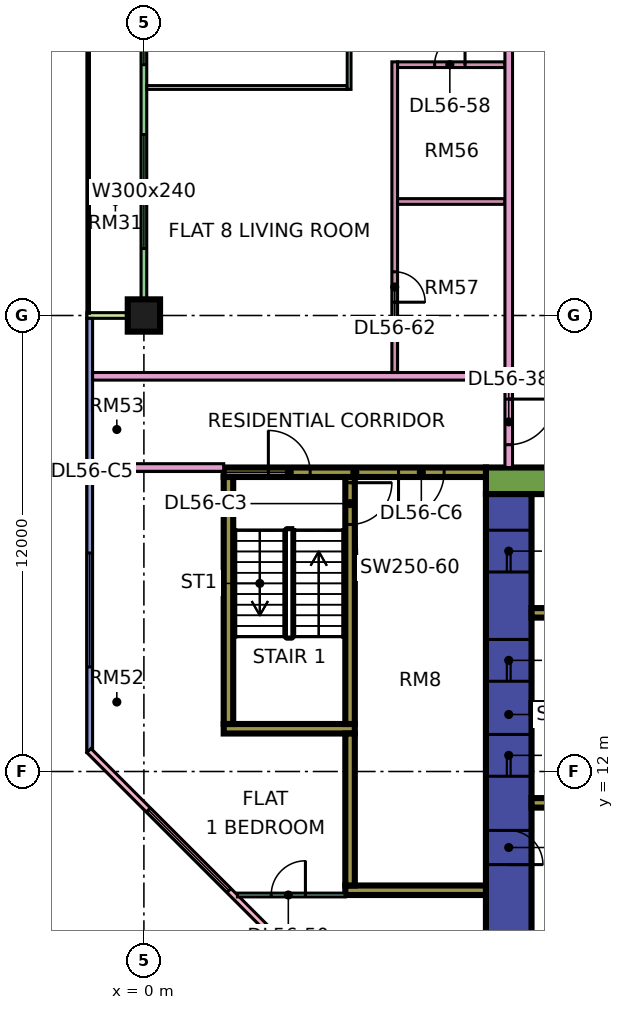
"""IFC4 building model, lengths in metres.
Left out: names, types, materials, properties, quantities, classifications, styles, units other than length and angle.
Written with IfcOpenShell. Run it as: python <this file> out.ifc"""

import sys

from ifc_helpers import new_model, si_unit, direction, frame, frame_2d, origin, origin_2d, place, context, subcontext, project, spatial, rectangle, extrude, element, fill, save


model = new_model("IFC4")
c1 = context("Model", 3, precision=1e-05, world=origin(), true_north=direction((0.0, 1.0)))
c2 = subcontext(c1, "Body", "Model", "MODEL_VIEW")
j1 = project(units=[si_unit("LENGTHUNIT", "METRE"), si_unit("PLANEANGLEUNIT", "RADIAN")], contexts=[c1])
p1 = place(None, origin())
s1 = spatial("IfcSite", under=j1, at=p1, CompositionType="ELEMENT")
p2 = place(p1, origin())
s2 = spatial("IfcBuilding", under=s1, at=p2, CompositionType="ELEMENT")
p3 = place(p2, frame((0.0, 0.0, 237.9)))
s3 = spatial("IfcBuildingStorey", under=s2, at=p3, CompositionType="ELEMENT", Elevation=237.9)
p4 = place(p3, frame((0.0, 24.0, 0.0), z_axis=(0.0, 0.0, 1.0), x_axis=(1.0, 0.0, 0.0)))
e1 = element("IfcColumn", 1, at=p4, inside=s3, PredefinedType="COLUMN", context=c2, shape_type="SweptSolid", body=[
    extrude(rectangle(XDim=0.85, YDim=0.85, at=origin_2d()), origin(), (0.0, 0.0, 1.0), 3.75),
])
p5 = place(p3, frame((9.0, 19.65, 0.0), z_axis=(0.0, 0.0, 1.0), x_axis=(1.0, 0.0, 0.0)))
e2 = element("IfcWall", 2, at=p5, inside=s3, PredefinedType="SHEAR", context=c2, shape_type="SweptSolid", body=[
    extrude(rectangle(XDim=25.0, YDim=0.7, at=frame_2d((12.5, 0.0))), origin(), (0.0, 0.0, 1.0), 3.75),
])
p6 = place(p5, frame((19.1, 0.0, 0.0)))
e3 = element("IfcOpeningElement", 3, at=p6, cuts=e2, PredefinedType="OPENING", context=c2, shape_type="SweptSolid", body=[
    extrude(rectangle(XDim=1.8, YDim=2.4, at=frame_2d((0.9, 1.2))), frame((0.0, 0.36, 0.0), z_axis=(0.0, -1.0, 0.0), x_axis=(1.0, 0.0, 0.0)), (0.0, 0.0, 1.0), 0.72),
])
p7 = place(p3, frame((9.6, 7.7, 0.0), z_axis=(0.0, 0.0, 1.0), x_axis=(0.0, 1.0, 0.0)))
e4 = element("IfcWall", 4, at=p7, inside=s3, PredefinedType="SHEAR", context=c2, shape_type="SweptSolid", body=[
    extrude(rectangle(XDim=11.6, YDim=1.2, at=frame_2d((5.8, 0.0))), origin(), (0.0, 0.0, 1.0), 3.75),
])
p8 = place(p7, frame((4.175, 0.0, 0.0)))
e5 = element("IfcOpeningElement", 5, at=p8, cuts=e4, PredefinedType="OPENING", context=c2, shape_type="SweptSolid", body=[
    extrude(rectangle(XDim=1.1, YDim=2.2, at=frame_2d((0.55, 1.1))), frame((0.0, 0.61, 0.0), z_axis=(0.0, -1.0, 0.0), x_axis=(1.0, 0.0, 0.0)), (0.0, 0.0, 1.0), 1.22),
])
p9 = place(p7, frame((6.675, 0.0, 0.0)))
e6 = element("IfcOpeningElement", 6, at=p9, cuts=e4, PredefinedType="OPENING", context=c2, shape_type="SweptSolid", body=[
    extrude(rectangle(XDim=1.1, YDim=2.2, at=frame_2d((0.55, 1.1))), frame((0.0, 0.61, 0.0), z_axis=(0.0, -1.0, 0.0), x_axis=(1.0, 0.0, 0.0)), (0.0, 0.0, 1.0), 1.22),
])
p10 = place(p7, frame((9.55, 0.0, 0.0)))
e7 = element("IfcOpeningElement", 7, at=p10, cuts=e4, PredefinedType="OPENING", context=c2, shape_type="SweptSolid", body=[
    extrude(rectangle(XDim=1.1, YDim=2.2, at=frame_2d((0.55, 1.1))), frame((0.0, 0.61, 0.0), z_axis=(0.0, -1.0, 0.0), x_axis=(1.0, 0.0, 0.0)), (0.0, 0.0, 1.0), 1.22),
])
p11 = place(p7, frame((1.85, 0.0, 0.0)))
e8 = element("IfcOpeningElement", 8, at=p11, cuts=e4, PredefinedType="OPENING", context=c2, shape_type="SweptSolid", body=[
    extrude(rectangle(XDim=0.9, YDim=2.1, at=frame_2d((0.45, 1.05))), frame((0.0, 0.61, 0.0), z_axis=(0.0, -1.0, 0.0), x_axis=(1.0, 0.0, 0.0)), (0.0, 0.0, 1.0), 1.22),
])
for number, where, z_axis, x_axis in (
    (9, (10.2, 11.175, 0.0), (0.0, 0.0, 1.0), (1.0, 0.0, 0.0)),
    (10, (10.2, 13.675, 0.0), (0.0, 0.0, 1.0), (1.0, 0.0, 0.0)),
    (11, (10.2, 16.175, 0.0), (0.0, 0.0, 1.0), (1.0, 0.0, 0.0)),
):
    element("IfcWall", number, at=place(p3, frame(where, z_axis=z_axis, x_axis=x_axis)), inside=s3, PredefinedType="SHEAR", context=c2, shape_type="SweptSolid", body=[
        extrude(rectangle(XDim=3.0, YDim=0.25, at=frame_2d((1.5, 0.0))), origin(), (0.0, 0.0, 1.0), 3.75),
    ])
p12 = place(p3, frame((2.1, 19.875, 0.0), z_axis=(0.0, 0.0, 1.0), x_axis=(1.0, 0.0, 0.0)))
e12 = element("IfcWall", 12, at=p12, inside=s3, PredefinedType="SHEAR", context=c2, shape_type="SweptSolid", body=[
    extrude(rectangle(XDim=6.9, YDim=0.25, at=frame_2d((3.45, 0.0))), origin(), (0.0, 0.0, 1.0), 3.75),
])
p13 = place(p12, frame((1.175, 0.0, 0.0)))
e13 = element("IfcOpeningElement", 13, at=p13, cuts=e12, PredefinedType="OPENING", context=c2, shape_type="SweptSolid", body=[
    extrude(rectangle(XDim=1.1, YDim=2.2, at=frame_2d((0.55, 1.1))), frame((0.0, 0.135, 0.0), z_axis=(0.0, -1.0, 0.0), x_axis=(1.0, 0.0, 0.0)), (0.0, 0.0, 1.0), 0.27),
])
p14 = place(p12, frame((4.6, 0.0, 0.0)))
e14 = element("IfcOpeningElement", 14, at=p14, cuts=e12, PredefinedType="OPENING", context=c2, shape_type="SweptSolid", body=[
    extrude(rectangle(XDim=1.2, YDim=2.2, at=frame_2d((0.6, 1.1))), frame((0.0, 0.135, 0.0), z_axis=(0.0, -1.0, 0.0), x_axis=(1.0, 0.0, 0.0)), (0.0, 0.0, 1.0), 0.27),
])
p15 = place(p3, frame((2.1, 13.125, 0.0), z_axis=(0.0, 0.0, 1.0), x_axis=(1.0, 0.0, 0.0)))
e15 = element("IfcWall", 15, at=p15, inside=s3, PredefinedType="SHEAR", context=c2, shape_type="SweptSolid", body=[
    extrude(rectangle(XDim=3.45, YDim=0.25, at=frame_2d((1.725, 0.0))), origin(), (0.0, 0.0, 1.0), 3.75),
])
p16 = place(p3, frame((2.225, 13.25, 0.0), z_axis=(0.0, 0.0, 1.0), x_axis=(0.0, 1.0, 0.0)))
e16 = element("IfcWall", 16, at=p16, inside=s3, PredefinedType="SHEAR", context=c2, shape_type="SweptSolid", body=[
    extrude(rectangle(XDim=6.5, YDim=0.25, at=frame_2d((3.25, 0.0))), origin(), (0.0, 0.0, 1.0), 3.75),
])
p17 = place(p3, frame((5.425, 13.25, 0.0), z_axis=(0.0, 0.0, 1.0), x_axis=(0.0, 1.0, 0.0)))
e17 = element("IfcWall", 17, at=p17, inside=s3, PredefinedType="SHEAR", context=c2, shape_type="SweptSolid", body=[
    extrude(rectangle(XDim=6.5, YDim=0.25, at=frame_2d((3.25, 0.0))), origin(), (0.0, 0.0, 1.0), 3.75),
])
p18 = place(p17, frame((5.25, 0.0, 0.0)))
e18 = element("IfcOpeningElement", 18, at=p18, cuts=e17, PredefinedType="OPENING", context=c2, shape_type="SweptSolid", body=[
    extrude(rectangle(XDim=1.1, YDim=2.2, at=frame_2d((0.55, 1.1))), frame((0.0, 0.135, 0.0), z_axis=(0.0, -1.0, 0.0), x_axis=(1.0, 0.0, 0.0)), (0.0, 0.0, 1.0), 0.27),
])
p19 = place(p3, frame((5.3, 8.875, 0.0), z_axis=(0.0, 0.0, 1.0), x_axis=(1.0, 0.0, 0.0)))
e19 = element("IfcWall", 19, at=p19, inside=s3, PredefinedType="SHEAR", context=c2, shape_type="SweptSolid", body=[
    extrude(rectangle(XDim=3.7, YDim=0.25, at=frame_2d((1.85, 0.0))), origin(), (0.0, 0.0, 1.0), 3.75),
])
p20 = place(p3, frame((5.425, 9.0, 0.0), z_axis=(0.0, 0.0, 1.0), x_axis=(0.0, 1.0, 0.0)))
e20 = element("IfcWall", 20, at=p20, inside=s3, PredefinedType="SHEAR", context=c2, shape_type="SweptSolid", body=[
    extrude(rectangle(XDim=4.0, YDim=0.25, at=frame_2d((2.0, 0.0))), origin(), (0.0, 0.0, 1.0), 3.75),
])
p21 = place(p3, frame((0.0, 35.925, 0.0), z_axis=(0.0, 0.0, 1.0), x_axis=(0.0, -1.0, 0.0)))
e21 = element("IfcWall", 21, at=p21, inside=s3, PredefinedType="SOLIDWALL", context=c2, shape_type="SweptSolid", body=[
    extrude(rectangle(XDim=11.85, YDim=0.15, at=frame_2d((5.925, 0.0))), origin(), (0.0, 0.0, 1.0), 3.35),
])
p22 = place(p21, frame((1.087, 0.0, 0.0)))
e22 = element("IfcOpeningElement", 22, at=p22, cuts=e21, PredefinedType="OPENING", context=c2, shape_type="SweptSolid", body=[
    extrude(rectangle(XDim=1.2, YDim=2.4, at=frame_2d((0.6, 1.2))), frame((0.0, 0.085, 0.0), z_axis=(0.0, -1.0, 0.0), x_axis=(1.0, 0.0, 0.0)), (0.0, 0.0, 1.0), 0.17),
])
p23 = place(p21, frame((3.525, 0.0, 0.45)))
e23 = element("IfcOpeningElement", 23, at=p23, cuts=e21, PredefinedType="OPENING", context=c2, shape_type="SweptSolid", body=[
    extrude(rectangle(XDim=1.8, YDim=2.4, at=frame_2d((0.9, 1.2))), frame((0.0, 0.085, 0.0), z_axis=(0.0, -1.0, 0.0), x_axis=(1.0, 0.0, 0.0)), (0.0, 0.0, 1.0), 0.17),
])
p24 = place(p21, frame((7.163, 0.0, 0.45)))
e24 = element("IfcOpeningElement", 24, at=p24, cuts=e21, PredefinedType="OPENING", context=c2, shape_type="SweptSolid", body=[
    extrude(rectangle(XDim=3.0, YDim=2.4, at=frame_2d((1.5, 1.2))), frame((0.0, 0.085, 0.0), z_axis=(0.0, -1.0, 0.0), x_axis=(1.0, 0.0, 0.0)), (0.0, 0.0, 1.0), 0.17),
])
p25 = place(p3, frame((-1.5, 24.0, 0.0), z_axis=(0.0, 0.0, 1.0), x_axis=(1.0, 0.0, 0.0)))
e25 = element("IfcWall", 25, at=p25, inside=s3, PredefinedType="SOLIDWALL", context=c2, shape_type="SweptSolid", body=[
    extrude(rectangle(XDim=1.5, YDim=0.15, at=frame_2d((0.75, 0.0))), origin(), (0.0, 0.0, 1.0), 3.35),
])
p26 = place(p3, frame((-1.425, 23.925, 0.0), z_axis=(0.0, 0.0, 1.0), x_axis=(0.0, -1.0, 0.0)))
e26 = element("IfcWall", 26, at=p26, inside=s3, PredefinedType="SOLIDWALL", context=c2, shape_type="SweptSolid", body=[
    extrude(rectangle(XDim=11.425, YDim=0.15, at=frame_2d((5.712, 0.0))), origin(), (0.0, 0.0, 1.0), 3.35),
])
p27 = place(p26, frame((6.175, 0.0, 0.45)))
e27 = element("IfcOpeningElement", 27, at=p27, cuts=e26, PredefinedType="OPENING", context=c2, shape_type="SweptSolid", body=[
    extrude(rectangle(XDim=3.0, YDim=2.4, at=frame_2d((1.5, 1.2))), frame((0.0, 0.085, 0.0), z_axis=(0.0, -1.0, 0.0), x_axis=(1.0, 0.0, 0.0)), (0.0, 0.0, 1.0), 0.17),
])
p28 = place(p3, frame((-1.447, 12.553, 0.0), z_axis=(0.0, 0.0, 1.0), x_axis=(0.707106781187, -0.707106781187, 0.0)))
e28 = element("IfcWall", 28, at=p28, inside=s3, PredefinedType="SOLIDWALL", context=c2, shape_type="SweptSolid", body=[
    extrude(rectangle(XDim=19.799, YDim=0.15, at=frame_2d((9.899, 0.0))), origin(), (0.0, 0.0, 1.0), 3.35),
])
p29 = place(p28, frame((2.212, 0.0, 0.45)))
e29 = element("IfcOpeningElement", 29, at=p29, cuts=e28, PredefinedType="OPENING", context=c2, shape_type="SweptSolid", body=[
    extrude(rectangle(XDim=3.0, YDim=2.4, at=frame_2d((1.5, 1.2))), frame((0.0, 0.085, 0.0), z_axis=(0.0, -1.0, 0.0), x_axis=(1.0, 0.0, 0.0)), (0.0, 0.0, 1.0), 0.17),
])
p30 = place(p28, frame((10.216, 0.0, 0.45)))
e30 = element("IfcOpeningElement", 30, at=p30, cuts=e28, PredefinedType="OPENING", context=c2, shape_type="SweptSolid", body=[
    extrude(rectangle(XDim=3.0, YDim=2.4, at=frame_2d((1.5, 1.2))), frame((0.0, 0.085, 0.0), z_axis=(0.0, -1.0, 0.0), x_axis=(1.0, 0.0, 0.0)), (0.0, 0.0, 1.0), 0.17),
])
p31 = place(p3, frame((-1.35, 20.0, 0.0), z_axis=(0.0, 0.0, 1.0), x_axis=(1.0, 0.0, 0.0)))
e31 = element("IfcWall", 31, at=p31, inside=s3, PredefinedType="PARTITIONING", context=c2, shape_type="SweptSolid", body=[
    extrude(rectangle(XDim=3.45, YDim=0.2, at=frame_2d((1.725, 0.0))), origin(), (0.0, 0.0, 1.0), 3.35),
])
p32 = place(p3, frame((-1.35, 22.4, 0.0), z_axis=(0.0, 0.0, 1.0), x_axis=(1.0, 0.0, 0.0)))
e32 = element("IfcWall", 32, at=p32, inside=s3, PredefinedType="PARTITIONING", context=c2, shape_type="SweptSolid", body=[
    extrude(rectangle(XDim=10.85, YDim=0.2, at=frame_2d((5.425, 0.0))), origin(), (0.0, 0.0, 1.0), 3.35),
])
p33 = place(p3, frame((0.074, 30.0, 0.0), z_axis=(0.0, 0.0, 1.0), x_axis=(1.0, 0.0, 0.0)))
e33 = element("IfcWall", 33, at=p33, inside=s3, PredefinedType="PARTITIONING", context=c2, shape_type="SweptSolid", body=[
    extrude(rectangle(XDim=5.276, YDim=0.1, at=frame_2d((2.638, 0.0))), origin(), (0.0, 0.0, 1.0), 3.35),
])
p34 = place(p3, frame((2.461, 8.75, 0.0), z_axis=(0.0, 0.0, 1.0), x_axis=(1.0, 0.0, 0.0)))
e34 = element("IfcWall", 34, at=p34, inside=s3, PredefinedType="PARTITIONING", context=c2, shape_type="SweptSolid", body=[
    extrude(rectangle(XDim=2.839, YDim=0.1, at=frame_2d((1.419, 0.0))), origin(), (0.0, 0.0, 1.0), 3.35),
])
p35 = place(p34, frame((0.889, 0.0, 0.0)))
e35 = element("IfcOpeningElement", 35, at=p35, cuts=e34, PredefinedType="OPENING", context=c2, shape_type="SweptSolid", body=[
    extrude(rectangle(XDim=0.9, YDim=2.1, at=frame_2d((0.45, 1.05))), frame((0.0, 0.06, 0.0), z_axis=(0.0, -1.0, 0.0), x_axis=(1.0, 0.0, 0.0)), (0.0, 0.0, 1.0), 0.12),
])
p36 = place(p3, frame((5.4, 29.95, 0.0), z_axis=(0.0, 0.0, 1.0), x_axis=(0.0, 1.0, 0.0)))
e36 = element("IfcWall", 36, at=p36, inside=s3, PredefinedType="PARTITIONING", context=c2, shape_type="SweptSolid", body=[
    extrude(rectangle(XDim=5.95, YDim=0.1, at=frame_2d((2.975, 0.0))), origin(), (0.0, 0.0, 1.0), 3.35),
])
p37 = place(p36, frame((1.1, 0.0, 0.0)))
e37 = element("IfcOpeningElement", 37, at=p37, cuts=e36, PredefinedType="OPENING", context=c2, shape_type="SweptSolid", body=[
    extrude(rectangle(XDim=0.9, YDim=2.1, at=frame_2d((0.45, 1.05))), frame((0.0, 0.06, 0.0), z_axis=(0.0, -1.0, 0.0), x_axis=(1.0, 0.0, 0.0)), (0.0, 0.0, 1.0), 0.12),
])
p38 = place(p36, frame((4.1, 0.0, 0.0)))
e38 = element("IfcOpeningElement", 38, at=p38, cuts=e36, PredefinedType="OPENING", context=c2, shape_type="SweptSolid", body=[
    extrude(rectangle(XDim=0.9, YDim=2.1, at=frame_2d((0.45, 1.05))), frame((0.0, 0.06, 0.0), z_axis=(0.0, -1.0, 0.0), x_axis=(1.0, 0.0, 0.0)), (0.0, 0.0, 1.0), 0.12),
])
p39 = place(p3, frame((6.6, 22.5, 0.0), z_axis=(0.0, 0.0, 1.0), x_axis=(0.0, 1.0, 0.0)))
e39 = element("IfcWall", 39, at=p39, inside=s3, PredefinedType="PARTITIONING", context=c2, shape_type="SweptSolid", body=[
    extrude(rectangle(XDim=8.175, YDim=0.15, at=frame_2d((4.087, 0.0))), origin(), (0.0, 0.0, 1.0), 3.35),
])
p40 = place(p39, frame((1.85, 0.0, 0.0)))
e40 = element("IfcOpeningElement", 40, at=p40, cuts=e39, PredefinedType="OPENING", context=c2, shape_type="SweptSolid", body=[
    extrude(rectangle(XDim=0.8, YDim=2.1, at=frame_2d((0.4, 1.05))), frame((0.0, 0.085, 0.0), z_axis=(0.0, -1.0, 0.0), x_axis=(1.0, 0.0, 0.0)), (0.0, 0.0, 1.0), 0.17),
])
p41 = place(p3, frame((6.675, 27.0, 0.0), z_axis=(0.0, 0.0, 1.0), x_axis=(1.0, 0.0, 0.0)))
e41 = element("IfcWall", 41, at=p41, inside=s3, PredefinedType="PARTITIONING", context=c2, shape_type="SweptSolid", body=[
    extrude(rectangle(XDim=2.825, YDim=0.15, at=frame_2d((1.413, 0.0))), origin(), (0.0, 0.0, 1.0), 3.35),
])
p42 = place(p3, frame((6.675, 30.6, 0.0), z_axis=(0.0, 0.0, 1.0), x_axis=(1.0, 0.0, 0.0)))
e42 = element("IfcWall", 42, at=p42, inside=s3, PredefinedType="PARTITIONING", context=c2, shape_type="SweptSolid", body=[
    extrude(rectangle(XDim=2.825, YDim=0.15, at=frame_2d((1.413, 0.0))), origin(), (0.0, 0.0, 1.0), 3.35),
])
p43 = place(p42, frame((0.975, 0.0, 0.0)))
e43 = element("IfcOpeningElement", 43, at=p43, cuts=e42, PredefinedType="OPENING", context=c2, shape_type="SweptSolid", body=[
    extrude(rectangle(XDim=0.8, YDim=2.1, at=frame_2d((0.4, 1.05))), frame((0.0, 0.085, 0.0), z_axis=(0.0, -1.0, 0.0), x_axis=(1.0, 0.0, 0.0)), (0.0, 0.0, 1.0), 0.17),
])
p44 = place(p3, frame((9.6, 20.0, 0.0), z_axis=(0.0, 0.0, 1.0), x_axis=(0.0, 1.0, 0.0)))
e44 = element("IfcWall", 44, at=p44, inside=s3, PredefinedType="PARTITIONING", context=c2, shape_type="SweptSolid", body=[
    extrude(rectangle(XDim=42.926, YDim=0.2, at=frame_2d((21.463, 0.0))), origin(), (0.0, 0.0, 1.0), 3.35),
])
p45 = place(p44, frame((28.95, 0.0, 0.0)))
e45 = element("IfcOpeningElement", 45, at=p45, cuts=e44, PredefinedType="OPENING", context=c2, shape_type="SweptSolid", body=[
    extrude(rectangle(XDim=1.0, YDim=2.1, at=frame_2d((0.5, 1.05))), frame((0.0, 0.11, 0.0), z_axis=(0.0, -1.0, 0.0), x_axis=(1.0, 0.0, 0.0)), (0.0, 0.0, 1.0), 0.22),
])
p46 = place(p44, frame((31.95, 0.0, 0.0)))
e46 = element("IfcOpeningElement", 46, at=p46, cuts=e44, PredefinedType="OPENING", context=c2, shape_type="SweptSolid", body=[
    extrude(rectangle(XDim=1.0, YDim=2.1, at=frame_2d((0.5, 1.05))), frame((0.0, 0.11, 0.0), z_axis=(0.0, -1.0, 0.0), x_axis=(1.0, 0.0, 0.0)), (0.0, 0.0, 1.0), 0.22),
])
p47 = place(p44, frame((0.6, 0.0, 0.0)))
e47 = element("IfcOpeningElement", 47, at=p47, cuts=e44, PredefinedType="OPENING", context=c2, shape_type="SweptSolid", body=[
    extrude(rectangle(XDim=1.2, YDim=2.1, at=frame_2d((0.6, 1.05))), frame((0.0, 0.11, 0.0), z_axis=(0.0, -1.0, 0.0), x_axis=(1.0, 0.0, 0.0)), (0.0, 0.0, 1.0), 0.22),
])
p48 = place(p44, frame((11.25, 0.0, 0.0)))
e48 = element("IfcOpeningElement", 48, at=p48, cuts=e44, PredefinedType="OPENING", context=c2, shape_type="SweptSolid", body=[
    extrude(rectangle(XDim=1.0, YDim=2.1, at=frame_2d((0.5, 1.05))), frame((0.0, 0.11, 0.0), z_axis=(0.0, -1.0, 0.0), x_axis=(1.0, 0.0, 0.0)), (0.0, 0.0, 1.0), 0.22),
])
p49 = place(p23, origin())
e49 = element("IfcWindow", 49, at=p49, inside=s3, PartitioningType="SINGLE_PANEL", PredefinedType="WINDOW", context=c2, shape_type="SweptSolid", body=[
    extrude(rectangle(XDim=1.8, YDim=2.4, at=frame_2d((0.9, 1.2))), frame((0.0, 0.03, 0.0), z_axis=(0.0, -1.0, 0.0), x_axis=(1.0, 0.0, 0.0)), (0.0, 0.0, 1.0), 0.06),
])
fill(e23, e49)
p50 = place(p24, origin())
e50 = element("IfcWindow", 50, at=p50, inside=s3, PartitioningType="SINGLE_PANEL", PredefinedType="WINDOW", context=c2, shape_type="SweptSolid", body=[
    extrude(rectangle(XDim=3.0, YDim=2.4, at=frame_2d((1.5, 1.2))), frame((0.0, 0.03, 0.0), z_axis=(0.0, -1.0, 0.0), x_axis=(1.0, 0.0, 0.0)), (0.0, 0.0, 1.0), 0.06),
])
fill(e24, e50)
p51 = place(p27, origin())
e51 = element("IfcWindow", 51, at=p51, inside=s3, PartitioningType="SINGLE_PANEL", PredefinedType="WINDOW", context=c2, shape_type="SweptSolid", body=[
    extrude(rectangle(XDim=3.0, YDim=2.4, at=frame_2d((1.5, 1.2))), frame((0.0, 0.03, 0.0), z_axis=(0.0, -1.0, 0.0), x_axis=(1.0, 0.0, 0.0)), (0.0, 0.0, 1.0), 0.06),
])
fill(e27, e51)
p52 = place(p29, origin())
e52 = element("IfcWindow", 52, at=p52, inside=s3, PartitioningType="SINGLE_PANEL", PredefinedType="WINDOW", context=c2, shape_type="SweptSolid", body=[
    extrude(rectangle(XDim=3.0, YDim=2.4, at=frame_2d((1.5, 1.2))), frame((0.0, 0.03, 0.0), z_axis=(0.0, -1.0, 0.0), x_axis=(1.0, 0.0, 0.0)), (0.0, 0.0, 1.0), 0.06),
])
fill(e29, e52)
p53 = place(p8, origin())
e53 = element("IfcDoor", 53, at=p53, inside=s3, OperationType="DOUBLE_DOOR_SLIDING", PredefinedType="DOOR", context=c2, shape_type="SweptSolid", body=[
    extrude(rectangle(XDim=1.1, YDim=2.2, at=frame_2d((0.55, 1.1))), frame((0.0, 0.025, 0.0), z_axis=(0.0, -1.0, 0.0), x_axis=(1.0, 0.0, 0.0)), (0.0, 0.0, 1.0), 0.05),
])
fill(e5, e53)
p54 = place(p9, origin())
e54 = element("IfcDoor", 54, at=p54, inside=s3, OperationType="DOUBLE_DOOR_SLIDING", PredefinedType="DOOR", context=c2, shape_type="SweptSolid", body=[
    extrude(rectangle(XDim=1.1, YDim=2.2, at=frame_2d((0.55, 1.1))), frame((0.0, 0.025, 0.0), z_axis=(0.0, -1.0, 0.0), x_axis=(1.0, 0.0, 0.0)), (0.0, 0.0, 1.0), 0.05),
])
fill(e6, e54)
p55 = place(p10, origin())
e55 = element("IfcDoor", 55, at=p55, inside=s3, OperationType="DOUBLE_DOOR_SLIDING", PredefinedType="DOOR", context=c2, shape_type="SweptSolid", body=[
    extrude(rectangle(XDim=1.1, YDim=2.2, at=frame_2d((0.55, 1.1))), frame((0.0, 0.025, 0.0), z_axis=(0.0, -1.0, 0.0), x_axis=(1.0, 0.0, 0.0)), (0.0, 0.0, 1.0), 0.05),
])
fill(e7, e55)
p56 = place(p18, origin())
e56 = element("IfcDoor", 56, at=p56, inside=s3, OperationType="SINGLE_SWING_RIGHT", PredefinedType="DOOR", context=c2, shape_type="SweptSolid", body=[
    extrude(rectangle(XDim=1.1, YDim=2.2, at=frame_2d((0.55, 1.1))), frame((0.0, 0.025, 0.0), z_axis=(0.0, -1.0, 0.0), x_axis=(1.0, 0.0, 0.0)), (0.0, 0.0, 1.0), 0.05),
])
fill(e18, e56)
p57 = place(p11, frame((0.9, 0.0, 0.0), z_axis=(0.0, 0.0, 1.0), x_axis=(-1.0, 0.0, 0.0)))
e57 = element("IfcDoor", 57, at=p57, inside=s3, OperationType="SINGLE_SWING_LEFT", PredefinedType="DOOR", context=c2, shape_type="SweptSolid", body=[
    extrude(rectangle(XDim=0.9, YDim=2.1, at=frame_2d((0.45, 1.05))), frame((0.0, 0.025, 0.0), z_axis=(0.0, -1.0, 0.0), x_axis=(1.0, 0.0, 0.0)), (0.0, 0.0, 1.0), 0.05),
])
fill(e8, e57)
p58 = place(p13, origin())
e58 = element("IfcDoor", 58, at=p58, inside=s3, OperationType="SINGLE_SWING_LEFT", PredefinedType="DOOR", context=c2, shape_type="SweptSolid", body=[
    extrude(rectangle(XDim=1.1, YDim=2.2, at=frame_2d((0.55, 1.1))), frame((0.0, 0.025, 0.0), z_axis=(0.0, -1.0, 0.0), x_axis=(1.0, 0.0, 0.0)), (0.0, 0.0, 1.0), 0.05),
])
fill(e13, e58)
p59 = place(p14, frame((1.2, 0.0, 0.0), z_axis=(0.0, 0.0, 1.0), x_axis=(-1.0, 0.0, 0.0)))
e59 = element("IfcDoor", 59, at=p59, inside=s3, OperationType="SINGLE_SWING_LEFT", PredefinedType="DOOR", context=c2, shape_type="SweptSolid", body=[
    extrude(rectangle(XDim=1.2, YDim=2.2, at=frame_2d((0.6, 1.1))), frame((0.0, 0.025, 0.0), z_axis=(0.0, -1.0, 0.0), x_axis=(1.0, 0.0, 0.0)), (0.0, 0.0, 1.0), 0.05),
])
fill(e14, e59)
p60 = place(p47, origin())
e60 = element("IfcDoor", 60, at=p60, inside=s3, OperationType="SINGLE_SWING_RIGHT", PredefinedType="DOOR", context=c2, shape_type="SweptSolid", body=[
    extrude(rectangle(XDim=1.2, YDim=2.1, at=frame_2d((0.6, 1.05))), frame((0.0, 0.025, 0.0), z_axis=(0.0, -1.0, 0.0), x_axis=(1.0, 0.0, 0.0)), (0.0, 0.0, 1.0), 0.05),
])
fill(e47, e60)
p61 = place(p35, frame((0.9, 0.0, 0.0), z_axis=(0.0, 0.0, 1.0), x_axis=(-1.0, 0.0, 0.0)))
e61 = element("IfcDoor", 61, at=p61, inside=s3, OperationType="SINGLE_SWING_RIGHT", PredefinedType="DOOR", context=c2, shape_type="SweptSolid", body=[
    extrude(rectangle(XDim=0.9, YDim=2.1, at=frame_2d((0.45, 1.05))), frame((0.0, 0.025, 0.0), z_axis=(0.0, -1.0, 0.0), x_axis=(1.0, 0.0, 0.0)), (0.0, 0.0, 1.0), 0.05),
])
fill(e35, e61)
p62 = place(p43, frame((0.8, 0.0, 0.0), z_axis=(0.0, 0.0, 1.0), x_axis=(-1.0, 0.0, 0.0)))
e62 = element("IfcDoor", 62, at=p62, inside=s3, OperationType="SINGLE_SWING_RIGHT", PredefinedType="DOOR", context=c2, shape_type="SweptSolid", body=[
    extrude(rectangle(XDim=0.8, YDim=2.1, at=frame_2d((0.4, 1.05))), frame((0.0, 0.025, 0.0), z_axis=(0.0, -1.0, 0.0), x_axis=(1.0, 0.0, 0.0)), (0.0, 0.0, 1.0), 0.05),
])
fill(e43, e62)
p63 = place(p40, frame((0.8, 0.0, 0.0), z_axis=(0.0, 0.0, 1.0), x_axis=(-1.0, 0.0, 0.0)))
e63 = element("IfcDoor", 63, at=p63, inside=s3, OperationType="SINGLE_SWING_LEFT", PredefinedType="DOOR", context=c2, shape_type="SweptSolid", body=[
    extrude(rectangle(XDim=0.8, YDim=2.1, at=frame_2d((0.4, 1.05))), frame((0.0, 0.025, 0.0), z_axis=(0.0, -1.0, 0.0), x_axis=(1.0, 0.0, 0.0)), (0.0, 0.0, 1.0), 0.05),
])
fill(e40, e63)
save(model, sys.argv[1])
